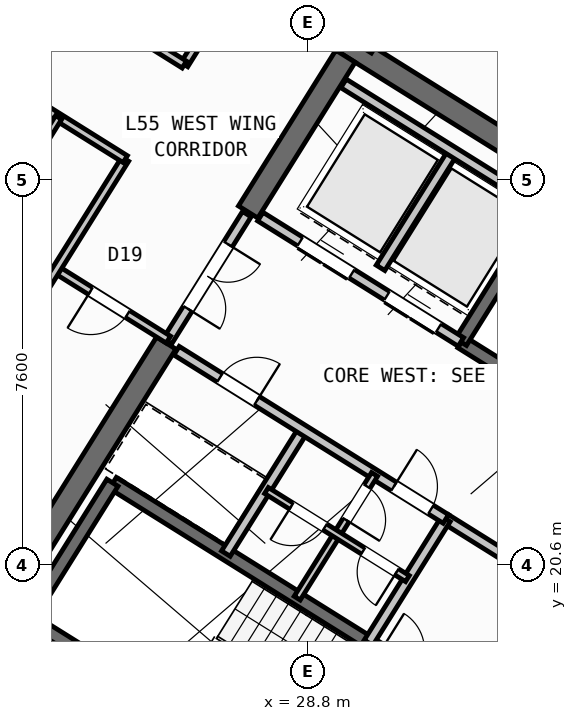
"""IFC4 building model, lengths in metres.
Left out: names, types, materials, properties, quantities, classifications, styles, units other than length and angle.
Written with IfcOpenShell. Run it as: python <this file> out.ifc"""

import sys

from ifc_helpers import new_model, si_unit, direction, frame, frame_2d, origin, origin_2d, place, context, subcontext, project, spatial, rectangle, hollow_rectangle, extrude, source, transform, mapped, element, fill, save


model = new_model("IFC4")
c1 = context("Model", 3, precision=1e-05, world=origin(), true_north=direction((0.0, 1.0)))
c2 = subcontext(c1, "Body", "Model", "MODEL_VIEW")
j1 = project(units=[si_unit("LENGTHUNIT", "METRE"), si_unit("PLANEANGLEUNIT", "RADIAN")], contexts=[c1])
p1 = place(None, origin())
s1 = spatial("IfcSite", under=j1, at=p1, CompositionType="ELEMENT")
p2 = place(p1, origin())
s2 = spatial("IfcBuilding", under=s1, at=p2, CompositionType="ELEMENT")
p3 = place(p2, frame((0.0, 0.0, 218.4)))
s3 = spatial("IfcBuildingStorey", under=s2, at=p3, CompositionType="ELEMENT", Elevation=218.4)
p4 = place(p3, frame((40.531, 24.036, 0.0), z_axis=(0.0, 0.0, 1.0), x_axis=(-0.848048787466, 0.529918157905, 0.0)))
e1 = element("IfcWall", 1, at=p4, inside=s3, PredefinedType="SHEAR", context=c2, shape_type="SweptSolid", body=[
    extrude(rectangle(XDim=13.04, YDim=0.45, at=frame_2d((6.52, 0.0))), origin(), (0.0, 0.0, 1.0), 3.35),
])
p5 = place(p3, frame((33.324, 12.503, 0.0), z_axis=(0.0, 0.0, 1.0), x_axis=(-0.848043529849, 0.529926571782, 0.0)))
e2 = element("IfcWall", 2, at=p5, inside=s3, PredefinedType="SHEAR", context=c2, shape_type="SweptSolid", body=[
    extrude(rectangle(XDim=13.04, YDim=0.45, at=frame_2d((6.52, 0.0))), origin(), (0.0, 0.0, 1.0), 3.35),
])
p6 = place(p3, frame((29.544, 30.636, 0.0), z_axis=(0.0, 0.0, 1.0), x_axis=(-0.529902075036, -0.848058836916, 0.0)))
e3 = element("IfcWall", 3, at=p6, inside=s3, PredefinedType="SHEAR", context=c2, shape_type="SweptSolid", body=[
    extrude(rectangle(XDim=3.625, YDim=0.45, at=frame_2d((1.812, 0.0))), origin(), (0.0, 0.0, 1.0), 3.35),
])
p7 = place(p3, frame((26.007, 24.976, 0.0), z_axis=(0.0, 0.0, 1.0), x_axis=(-0.529931155655, -0.848040665456, 0.0)))
e4 = element("IfcWall", 4, at=p7, inside=s3, PredefinedType="SHEAR", context=c2, shape_type="SweptSolid", body=[
    extrude(rectangle(XDim=6.475, YDim=0.45, at=frame_2d((3.238, 0.0))), origin(), (0.0, 0.0, 1.0), 3.35),
])
m1 = source(origin(), c2, "Body", "SweptSolid", [
    extrude(hollow_rectangle(XDim=0.8, YDim=0.8, WallThickness=0.032, at=origin_2d()), origin(), (0.0, 0.0, 1.0), 3.6),
])
p8 = place(p3, frame((29.928, 31.251, 0.0), z_axis=(0.0, 0.0, 1.0), x_axis=(-0.848048096156, 0.529919264233, 0.0)))
e5 = element("IfcColumn", 5, at=p8, inside=s3, PredefinedType="COLUMN", context=c2, shape_type="MappedRepresentation", body=[
    mapped(m1, transform((0.0, 0.0, 0.0), scale=1.0)),
])
p9 = place(p3, frame((31.76, 12.183, 0.0), z_axis=(0.0, 0.0, 1.0), x_axis=(-0.848047074256, 0.529920899612, 0.0)))
e6 = element("IfcWall", 6, at=p9, inside=s3, PredefinedType="STANDARD", context=c2, shape_type="SweptSolid", body=[
    extrude(rectangle(XDim=30.652, YDim=0.32, at=frame_2d((15.326, 0.0))), origin(), (0.0, 0.0, 1.0), 3.35),
])
p10 = place(p9, frame((15.166, 0.0, 0.0)))
e7 = element("IfcOpeningElement", 7, at=p10, cuts=e6, PredefinedType="OPENING", context=c2, shape_type="SweptSolid", body=[
    extrude(rectangle(XDim=1.2, YDim=2.15, at=frame_2d((0.6, 1.075))), frame((0.0, 0.17, 0.0), z_axis=(0.0, -1.0, 0.0), x_axis=(1.0, 0.0, 0.0)), (0.0, 0.0, 1.0), 0.34),
])
p11 = place(p9, frame((2.24, 0.0, 0.9)))
e8 = element("IfcOpeningElement", 8, at=p11, cuts=e6, PredefinedType="OPENING", context=c2, shape_type="SweptSolid", body=[
    extrude(rectangle(XDim=1.65, YDim=1.45, at=frame_2d((0.825, 0.725))), frame((0.0, 0.17, 0.0), z_axis=(0.0, -1.0, 0.0), x_axis=(1.0, 0.0, 0.0)), (0.0, 0.0, 1.0), 0.34),
])
p12 = place(p9, frame((7.469, 0.0, 0.9)))
e9 = element("IfcOpeningElement", 9, at=p12, cuts=e6, PredefinedType="OPENING", context=c2, shape_type="SweptSolid", body=[
    extrude(rectangle(XDim=1.65, YDim=1.45, at=frame_2d((0.825, 0.725))), frame((0.0, 0.17, 0.0), z_axis=(0.0, -1.0, 0.0), x_axis=(1.0, 0.0, 0.0)), (0.0, 0.0, 1.0), 0.34),
])
p13 = place(p9, frame((12.623, 0.0, 1.0)))
e10 = element("IfcOpeningElement", 10, at=p13, cuts=e6, PredefinedType="OPENING", context=c2, shape_type="SweptSolid", body=[
    extrude(rectangle(XDim=0.9, YDim=1.25, at=frame_2d((0.45, 0.625))), frame((0.0, 0.17, 0.0), z_axis=(0.0, -1.0, 0.0), x_axis=(1.0, 0.0, 0.0)), (0.0, 0.0, 1.0), 0.34),
])
p14 = place(p9, frame((19.583, 0.0, 1.0)))
e11 = element("IfcOpeningElement", 11, at=p14, cuts=e6, PredefinedType="OPENING", context=c2, shape_type="SweptSolid", body=[
    extrude(rectangle(XDim=0.9, YDim=1.25, at=frame_2d((0.45, 0.625))), frame((0.0, 0.17, 0.0), z_axis=(0.0, -1.0, 0.0), x_axis=(1.0, 0.0, 0.0)), (0.0, 0.0, 1.0), 0.34),
])
p15 = place(p9, frame((22.033, 0.0, 1.0)))
e12 = element("IfcOpeningElement", 12, at=p15, cuts=e6, PredefinedType="OPENING", context=c2, shape_type="SweptSolid", body=[
    extrude(rectangle(XDim=0.9, YDim=1.25, at=frame_2d((0.45, 0.625))), frame((0.0, 0.17, 0.0), z_axis=(0.0, -1.0, 0.0), x_axis=(1.0, 0.0, 0.0)), (0.0, 0.0, 1.0), 0.34),
])
p16 = place(p9, frame((27.666, 0.0, 0.9)))
e13 = element("IfcOpeningElement", 13, at=p16, cuts=e6, PredefinedType="OPENING", context=c2, shape_type="SweptSolid", body=[
    extrude(rectangle(XDim=1.35, YDim=1.45, at=frame_2d((0.675, 0.725))), frame((0.0, 0.17, 0.0), z_axis=(0.0, -1.0, 0.0), x_axis=(1.0, 0.0, 0.0)), (0.0, 0.0, 1.0), 0.34),
])
p17 = place(p3, frame((29.605, 15.581, 0.0), z_axis=(0.0, 0.0, 1.0), x_axis=(-0.848036911448, 0.529937163087, 0.0)))
e14 = element("IfcWall", 14, at=p17, inside=s3, PredefinedType="SHEAR", context=c2, shape_type="SweptSolid", body=[
    extrude(rectangle(XDim=7.46, YDim=0.26, at=frame_2d((3.73, 0.0))), origin(), (0.0, 0.0, 1.0), 3.35),
])
p18 = place(p3, frame((31.28, 18.261, 0.0), z_axis=(0.0, 0.0, 1.0), x_axis=(-0.848051618787, 0.529913626805, 0.0)))
e15 = element("IfcWall", 15, at=p18, inside=s3, PredefinedType="SHEAR", context=c2, shape_type="SweptSolid", body=[
    extrude(rectangle(XDim=7.46, YDim=0.26, at=frame_2d((3.73, 0.0))), origin(), (0.0, 0.0, 1.0), 3.35),
])
p19 = place(p18, frame((0.36, 0.0, 0.0)))
e16 = element("IfcOpeningElement", 16, at=p19, cuts=e15, PredefinedType="OPENING", context=c2, shape_type="SweptSolid", body=[
    extrude(rectangle(XDim=0.86, YDim=2.05, at=frame_2d((0.43, 1.025))), frame((0.0, 0.14, 0.0), z_axis=(0.0, -1.0, 0.0), x_axis=(1.0, 0.0, 0.0)), (0.0, 0.0, 1.0), 0.28),
])
p20 = place(p3, frame((24.945, 22.22, 0.0), z_axis=(0.0, 0.0, 1.0), x_axis=(-0.529908658664, -0.84805472316, 0.0)))
e17 = element("IfcWall", 17, at=p20, inside=s3, PredefinedType="SHEAR", context=c2, shape_type="SweptSolid", body=[
    extrude(rectangle(XDim=3.16, YDim=0.26, at=frame_2d((1.58, 0.0))), origin(), (0.0, 0.0, 1.0), 3.35),
])
p21 = place(p3, frame((38.046, 21.108, 0.0), z_axis=(0.0, 0.0, 1.0), x_axis=(-0.848054434086, 0.529909121291, 0.0)))
e18 = element("IfcWall", 18, at=p21, inside=s3, PredefinedType="SHEAR", context=c2, shape_type="SweptSolid", body=[
    extrude(rectangle(XDim=7.33, YDim=0.26, at=frame_2d((3.665, 0.0))), origin(), (0.0, 0.0, 1.0), 3.35),
])
p22 = place(p21, frame((0.22, 0.0, 0.0)))
e19 = element("IfcOpeningElement", 19, at=p22, cuts=e18, PredefinedType="OPENING", context=c2, shape_type="SweptSolid", body=[
    extrude(rectangle(XDim=1.1, YDim=2.1, at=frame_2d((0.55, 1.05))), frame((0.0, 0.14, 0.0), z_axis=(0.0, -1.0, 0.0), x_axis=(1.0, 0.0, 0.0)), (0.0, 0.0, 1.0), 0.28),
])
p23 = place(p3, frame((33.496, 27.677, 0.0), z_axis=(0.0, 0.0, 1.0), x_axis=(-0.529908658664, -0.84805472316, 0.0)))
e20 = element("IfcWall", 20, at=p23, inside=s3, PredefinedType="SHEAR", context=c2, shape_type="SweptSolid", body=[
    extrude(rectangle(XDim=3.16, YDim=0.26, at=frame_2d((1.58, 0.0))), origin(), (0.0, 0.0, 1.0), 3.35),
])
p24 = place(p3, frame((36.459, 18.421, 0.0), z_axis=(0.0, 0.0, 1.0), x_axis=(-0.848059591691, 0.529900867089, 0.0)))
e21 = element("IfcWall", 21, at=p24, inside=s3, PredefinedType="STANDARD", context=c2, shape_type="SweptSolid", body=[
    extrude(rectangle(XDim=5.818, YDim=0.2, at=frame_2d((2.909, 0.0))), origin(), (0.0, 0.0, 1.0), 3.34),
])
p25 = place(p24, frame((2.598, 0.0, 0.0)))
e22 = element("IfcOpeningElement", 22, at=p25, cuts=e21, PredefinedType="OPENING", context=c2, shape_type="SweptSolid", body=[
    extrude(rectangle(XDim=1.15, YDim=2.1, at=frame_2d((0.575, 1.05))), frame((0.0, 0.11, 0.0), z_axis=(0.0, -1.0, 0.0), x_axis=(1.0, 0.0, 0.0)), (0.0, 0.0, 1.0), 0.22),
])
p26 = place(p3, frame((31.822, 24.998, 0.0), z_axis=(0.0, 0.0, 1.0), x_axis=(-0.848054125777, 0.529909614701, 0.0)))
e23 = element("IfcWall", 23, at=p26, inside=s3, PredefinedType="STANDARD", context=c2, shape_type="SweptSolid", body=[
    extrude(rectangle(XDim=4.668, YDim=0.2, at=frame_2d((2.334, 0.0))), origin(), (0.0, 0.0, 1.0), 3.34),
])
p27 = place(p26, frame((0.52, 0.0, 0.0)))
e24 = element("IfcOpeningElement", 24, at=p27, cuts=e23, PredefinedType="OPENING", context=c2, shape_type="SweptSolid", body=[
    extrude(rectangle(XDim=1.2, YDim=2.15, at=frame_2d((0.6, 1.075))), frame((0.0, 0.11, 0.0), z_axis=(0.0, -1.0, 0.0), x_axis=(1.0, 0.0, 0.0)), (0.0, 0.0, 1.0), 0.22),
])
p28 = place(p26, frame((2.54, 0.0, 0.0)))
e25 = element("IfcOpeningElement", 25, at=p28, cuts=e23, PredefinedType="OPENING", context=c2, shape_type="SweptSolid", body=[
    extrude(rectangle(XDim=1.2, YDim=2.15, at=frame_2d((0.6, 1.075))), frame((0.0, 0.11, 0.0), z_axis=(0.0, -1.0, 0.0), x_axis=(1.0, 0.0, 0.0)), (0.0, 0.0, 1.0), 0.22),
])
p29 = place(p3, frame((31.645, 28.716, 0.0), z_axis=(0.0, 0.0, 1.0), x_axis=(-0.52986693015, -0.848080795876, 0.0)))
e26 = element("IfcWall", 26, at=p29, inside=s3, PredefinedType="STANDARD", context=c2, shape_type="SweptSolid", body=[
    extrude(rectangle(XDim=2.66, YDim=0.2, at=frame_2d((1.33, 0.0))), origin(), (0.0, 0.0, 1.0), 3.34),
])
p30 = place(p3, frame((33.363, 27.69, 0.0), z_axis=(0.0, 0.0, 1.0), x_axis=(-0.84804957148, 0.529916903215, 0.0)))
e27 = element("IfcWall", 27, at=p30, inside=s3, PredefinedType="STANDARD", context=c2, shape_type="SweptSolid", body=[
    extrude(rectangle(XDim=4.548, YDim=0.2, at=frame_2d((2.274, 0.0))), origin(), (0.0, 0.0, 1.0), 3.34),
])
for number, where, z_axis, x_axis in (
    (28, (31.525, 21.504, 0.0), (0.0, 0.0, 1.0), (-0.53, -0.848, 0.0)),
    (29, (28.71, 23.263, 0.0), (0.0, 0.0, 1.0), (-0.53, -0.848, 0.0)),
):
    element("IfcWall", number, at=place(p3, frame(where, z_axis=z_axis, x_axis=x_axis)), inside=s3, PredefinedType="STANDARD", context=c2, shape_type="SweptSolid", body=[
        extrude(rectangle(XDim=2.88, YDim=0.2, at=frame_2d((1.44, 0.0))), origin(), (0.0, 0.0, 1.0), 3.34),
    ])
p31 = place(p3, frame((31.525, 21.504, 0.0), z_axis=(0.0, 0.0, 1.0), x_axis=(-0.848042066329, 0.529928913853, 0.0)))
e30 = element("IfcWall", 30, at=p31, inside=s3, PredefinedType="STANDARD", context=c2, shape_type="SweptSolid", body=[
    extrude(rectangle(XDim=6.268, YDim=0.2, at=frame_2d((3.134, 0.0))), origin(), (0.0, 0.0, 1.0), 3.34),
])
p32 = place(p31, frame((4.4, 0.0, 0.0)))
e31 = element("IfcOpeningElement", 31, at=p32, cuts=e30, PredefinedType="OPENING", context=c2, shape_type="SweptSolid", body=[
    extrude(rectangle(XDim=0.86, YDim=2.05, at=frame_2d((0.43, 1.025))), frame((0.0, 0.11, 0.0), z_axis=(0.0, -1.0, 0.0), x_axis=(1.0, 0.0, 0.0)), (0.0, 0.0, 1.0), 0.22),
])
p33 = place(p31, frame((0.35, 0.0, 0.0)))
e32 = element("IfcOpeningElement", 32, at=p33, cuts=e30, PredefinedType="OPENING", context=c2, shape_type="SweptSolid", body=[
    extrude(rectangle(XDim=0.86, YDim=2.05, at=frame_2d((0.43, 1.025))), frame((0.0, 0.11, 0.0), z_axis=(0.0, -1.0, 0.0), x_axis=(1.0, 0.0, 0.0)), (0.0, 0.0, 1.0), 0.22),
])
p34 = place(p3, frame((30.117, 22.384, 0.0), z_axis=(0.0, 0.0, 1.0), x_axis=(-0.529951914384, -0.848027693204, 0.0)))
e33 = element("IfcWall", 33, at=p34, inside=s3, PredefinedType="PLUMBINGWALL", context=c2, shape_type="SweptSolid", body=[
    extrude(rectangle(XDim=1.4, YDim=0.14, at=frame_2d((0.7, 0.0))), origin(), (0.0, 0.0, 1.0), 3.34),
])
p35 = place(p34, frame((0.28, 0.0, 0.0)))
e34 = element("IfcOpeningElement", 34, at=p35, cuts=e33, PredefinedType="OPENING", context=c2, shape_type="SweptSolid", body=[
    extrude(rectangle(XDim=0.78, YDim=2.05, at=frame_2d((0.39, 1.025))), frame((0.0, 0.08, 0.0), z_axis=(0.0, -1.0, 0.0), x_axis=(1.0, 0.0, 0.0)), (0.0, 0.0, 1.0), 0.16),
])
p36 = place(p3, frame((29.375, 21.196, 0.0), z_axis=(0.0, 0.0, 1.0), x_axis=(-0.529865479138, -0.848081702443, 0.0)))
e35 = element("IfcWall", 35, at=p36, inside=s3, PredefinedType="PLUMBINGWALL", context=c2, shape_type="SweptSolid", body=[
    extrude(rectangle(XDim=1.48, YDim=0.14, at=frame_2d((0.74, 0.0))), origin(), (0.0, 0.0, 1.0), 3.34),
])
p37 = place(p3, frame((30.766, 20.327, 0.0), z_axis=(0.0, 0.0, 1.0), x_axis=(-0.848052663127, 0.529911955482, 0.0)))
e36 = element("IfcWall", 36, at=p37, inside=s3, PredefinedType="PLUMBINGWALL", context=c2, shape_type="SweptSolid", body=[
    extrude(rectangle(XDim=3.28, YDim=0.14, at=frame_2d((1.64, 0.0))), origin(), (0.0, 0.0, 1.0), 3.34),
])
p38 = place(p37, frame((0.25, 0.0, 0.0)))
e37 = element("IfcOpeningElement", 37, at=p38, cuts=e36, PredefinedType="OPENING", context=c2, shape_type="SweptSolid", body=[
    extrude(rectangle(XDim=0.78, YDim=2.05, at=frame_2d((0.39, 1.025))), frame((0.0, 0.08, 0.0), z_axis=(0.0, -1.0, 0.0), x_axis=(1.0, 0.0, 0.0)), (0.0, 0.0, 1.0), 0.16),
])
p39 = place(p37, frame((1.92, 0.0, 0.0)))
e38 = element("IfcOpeningElement", 38, at=p39, cuts=e36, PredefinedType="OPENING", context=c2, shape_type="SweptSolid", body=[
    extrude(rectangle(XDim=0.78, YDim=2.05, at=frame_2d((0.39, 1.025))), frame((0.0, 0.08, 0.0), z_axis=(0.0, -1.0, 0.0), x_axis=(1.0, 0.0, 0.0)), (0.0, 0.0, 1.0), 0.16),
])
p40 = place(p3, frame((27.596, 27.52, 0.0), z_axis=(0.0, 0.0, 1.0), x_axis=(-0.529865479138, -0.848081702443, 0.0)))
e39 = element("IfcWall", 39, at=p40, inside=s3, PredefinedType="STANDARD", context=c2, shape_type="SweptSolid", body=[
    extrude(rectangle(XDim=2.96, YDim=0.2, at=frame_2d((1.48, 0.0))), origin(), (0.0, 0.0, 1.0), 3.34),
])
p41 = place(p40, frame((0.7, 0.0, 0.0)))
e40 = element("IfcOpeningElement", 40, at=p41, cuts=e39, PredefinedType="OPENING", context=c2, shape_type="SweptSolid", body=[
    extrude(rectangle(XDim=1.5, YDim=2.15, at=frame_2d((0.75, 1.075))), frame((0.0, 0.11, 0.0), z_axis=(0.0, -1.0, 0.0), x_axis=(1.0, 0.0, 0.0)), (0.0, 0.0, 1.0), 0.22),
])
p42 = place(p3, frame((26.049, 25.044, 0.0), z_axis=(0.0, 0.0, 1.0), x_axis=(-0.848050851465, 0.529914854792, 0.0)))
e41 = element("IfcWall", 41, at=p42, inside=s3, PredefinedType="PARTITIONING", context=c2, shape_type="SweptSolid", body=[
    extrude(rectangle(XDim=2.61, YDim=0.16, at=frame_2d((1.305, 0.0))), origin(), (0.0, 0.0, 1.0), 2.825),
])
p43 = place(p42, frame((0.95, 0.0, 0.0)))
e42 = element("IfcOpeningElement", 42, at=p43, cuts=e41, PredefinedType="OPENING", context=c2, shape_type="SweptSolid", body=[
    extrude(rectangle(XDim=0.86, YDim=2.05, at=frame_2d((0.43, 1.025))), frame((0.0, 0.09, 0.0), z_axis=(0.0, -1.0, 0.0), x_axis=(1.0, 0.0, 0.0)), (0.0, 0.0, 1.0), 0.18),
])
p44 = place(p3, frame((31.239, 38.274, 0.0), z_axis=(0.0, 0.0, 1.0), x_axis=(-0.529920220799, -0.848047498427, 0.0)))
e43 = element("IfcWall", 43, at=p44, inside=s3, PredefinedType="PARTITIONING", context=c2, shape_type="SweptSolid", body=[
    extrude(rectangle(XDim=9.2, YDim=0.16, at=frame_2d((4.6, 0.0))), origin(), (0.0, 0.0, 1.0), 3.34),
])
p45 = place(p3, frame((25.198, 28.606, 0.0), z_axis=(0.0, 0.0, 1.0), x_axis=(-0.529926497642, -0.848043576178, 0.0)))
e44 = element("IfcWall", 44, at=p45, inside=s3, PredefinedType="PARTITIONING", context=c2, shape_type="SweptSolid", body=[
    extrude(rectangle(XDim=10.3, YDim=0.16, at=frame_2d((5.15, 0.0))), origin(), (0.0, 0.0, 1.0), 3.34),
])
p46 = place(p3, frame((26.363, 30.472, 0.0), z_axis=(0.0, 0.0, 1.0), x_axis=(-0.848052408131, 0.529912363569, 0.0)))
e45 = element("IfcWall", 45, at=p46, inside=s3, PredefinedType="PARTITIONING", context=c2, shape_type="SweptSolid", body=[
    extrude(rectangle(XDim=16.73, YDim=0.16, at=frame_2d((8.365, 0.0))), origin(), (0.0, 0.0, 1.0), 3.34),
])
p47 = place(p46, frame((2.22, 0.0, 0.0)))
e46 = element("IfcOpeningElement", 46, at=p47, cuts=e45, PredefinedType="OPENING", context=c2, shape_type="SweptSolid", body=[
    extrude(rectangle(XDim=0.86, YDim=2.05, at=frame_2d((0.43, 1.025))), frame((0.0, 0.09, 0.0), z_axis=(0.0, -1.0, 0.0), x_axis=(1.0, 0.0, 0.0)), (0.0, 0.0, 1.0), 0.18),
])
p48 = place(p46, frame((7.82, 0.0, 0.0)))
e47 = element("IfcOpeningElement", 47, at=p48, cuts=e45, PredefinedType="OPENING", context=c2, shape_type="SweptSolid", body=[
    extrude(rectangle(XDim=1.0, YDim=2.1, at=frame_2d((0.5, 1.05))), frame((0.0, 0.09, 0.0), z_axis=(0.0, -1.0, 0.0), x_axis=(1.0, 0.0, 0.0)), (0.0, 0.0, 1.0), 0.18),
])
p49 = place(p46, frame((12.95, 0.0, 0.0)))
e48 = element("IfcOpeningElement", 48, at=p49, cuts=e45, PredefinedType="OPENING", context=c2, shape_type="SweptSolid", body=[
    extrude(rectangle(XDim=1.0, YDim=2.1, at=frame_2d((0.5, 1.05))), frame((0.0, 0.09, 0.0), z_axis=(0.0, -1.0, 0.0), x_axis=(1.0, 0.0, 0.0)), (0.0, 0.0, 1.0), 0.18),
])
p50 = place(p3, frame((25.198, 28.606, 0.0), z_axis=(0.0, 0.0, 1.0), x_axis=(-0.848052408131, 0.529912363569, 0.0)))
e49 = element("IfcWall", 49, at=p50, inside=s3, PredefinedType="PARTITIONING", context=c2, shape_type="SweptSolid", body=[
    extrude(rectangle(XDim=16.73, YDim=0.16, at=frame_2d((8.365, 0.0))), origin(), (0.0, 0.0, 1.0), 3.34),
])
p51 = place(p50, frame((2.22, 0.0, 0.0)))
e50 = element("IfcOpeningElement", 50, at=p51, cuts=e49, PredefinedType="OPENING", context=c2, shape_type="SweptSolid", body=[
    extrude(rectangle(XDim=0.86, YDim=2.05, at=frame_2d((0.43, 1.025))), frame((0.0, 0.09, 0.0), z_axis=(0.0, -1.0, 0.0), x_axis=(1.0, 0.0, 0.0)), (0.0, 0.0, 1.0), 0.18),
])
p52 = place(p50, frame((12.084, 0.0, 0.0)))
e51 = element("IfcOpeningElement", 51, at=p52, cuts=e49, PredefinedType="OPENING", context=c2, shape_type="SweptSolid", body=[
    extrude(rectangle(XDim=1.0, YDim=2.1, at=frame_2d((0.5, 1.05))), frame((0.0, 0.09, 0.0), z_axis=(0.0, -1.0, 0.0), x_axis=(1.0, 0.0, 0.0)), (0.0, 0.0, 1.0), 0.18),
])
p53 = place(p3, frame((23.883, 29.427, 0.0), z_axis=(0.0, 0.0, 1.0), x_axis=(-0.529950281337, -0.84802871373, 0.0)))
e52 = element("IfcWall", 52, at=p53, inside=s3, PredefinedType="PLUMBINGWALL", context=c2, shape_type="SweptSolid", body=[
    extrude(rectangle(XDim=4.51, YDim=0.14, at=frame_2d((2.255, 0.0))), origin(), (0.0, 0.0, 1.0), 2.995),
])
p54 = place(p53, frame((1.865, 0.0, 0.0)))
e53 = element("IfcOpeningElement", 53, at=p54, cuts=e52, PredefinedType="OPENING", context=c2, shape_type="SweptSolid", body=[
    extrude(rectangle(XDim=0.78, YDim=2.05, at=frame_2d((0.39, 1.025))), frame((0.0, 0.08, 0.0), z_axis=(0.0, -1.0, 0.0), x_axis=(1.0, 0.0, 0.0)), (0.0, 0.0, 1.0), 0.16),
])
p55 = place(p3, frame((41.936, 26.012, 0.0), z_axis=(0.0, 0.0, 1.0), x_axis=(-0.848051154596, 0.529914369676, 0.0)))
e54 = element("IfcWall", 54, at=p55, inside=s3, PredefinedType="PARTITIONING", context=c2, shape_type="SweptSolid", body=[
    extrude(rectangle(XDim=15.57, YDim=0.16, at=frame_2d((7.785, 0.0))), origin(), (0.0, 0.0, 1.0), 3.34),
])
p56 = place(p55, frame((3.415, 0.0, 0.0)))
e55 = element("IfcOpeningElement", 55, at=p56, cuts=e54, PredefinedType="OPENING", context=c2, shape_type="SweptSolid", body=[
    extrude(rectangle(XDim=1.0, YDim=2.1, at=frame_2d((0.5, 1.05))), frame((0.0, 0.09, 0.0), z_axis=(0.0, -1.0, 0.0), x_axis=(1.0, 0.0, 0.0)), (0.0, 0.0, 1.0), 0.18),
])
p57 = place(p55, frame((10.565, 0.0, 0.0)))
e56 = element("IfcOpeningElement", 56, at=p57, cuts=e54, PredefinedType="OPENING", context=c2, shape_type="SweptSolid", body=[
    extrude(rectangle(XDim=1.0, YDim=2.1, at=frame_2d((0.5, 1.05))), frame((0.0, 0.09, 0.0), z_axis=(0.0, -1.0, 0.0), x_axis=(1.0, 0.0, 0.0)), (0.0, 0.0, 1.0), 0.18),
])
m2 = source(origin(), c2, "Body", "SweptSolid", [
    extrude(rectangle(XDim=1.2, YDim=2.15, at=frame_2d((0.6, 1.075))), frame((0.0, 0.025, 0.0), z_axis=(0.0, -1.0, 0.0), x_axis=(1.0, 0.0, 0.0)), (0.0, 0.0, 1.0), 0.05),
])
p58 = place(p27, origin())
e57 = element("IfcDoor", 57, at=p58, inside=s3, OperationType="DOUBLE_DOOR_SLIDING", PredefinedType="DOOR", context=c2, shape_type="MappedRepresentation", body=[
    mapped(m2, transform((0.0, 0.0, 0.0), scale=1.0)),
])
fill(e24, e57)
p59 = place(p28, origin())
e58 = element("IfcDoor", 58, at=p59, inside=s3, OperationType="DOUBLE_DOOR_SLIDING", PredefinedType="DOOR", context=c2, shape_type="MappedRepresentation", body=[
    mapped(m2, transform((0.0, 0.0, 0.0), scale=1.0)),
])
fill(e25, e58)
m3 = source(origin(), c2, "Body", "SweptSolid", [
    extrude(rectangle(XDim=0.86, YDim=2.05, at=frame_2d((0.43, 1.025))), frame((0.0, 0.025, 0.0), z_axis=(0.0, -1.0, 0.0), x_axis=(1.0, 0.0, 0.0)), (0.0, 0.0, 1.0), 0.05),
])
p60 = place(p32, frame((0.86, 0.0, 0.0), z_axis=(0.0, 0.0, 1.0), x_axis=(-1.0, 0.0, 0.0)))
e59 = element("IfcDoor", 59, at=p60, inside=s3, OperationType="SINGLE_SWING_RIGHT", PredefinedType="DOOR", context=c2, shape_type="MappedRepresentation", body=[
    mapped(m3, transform((0.0, 0.0, 0.0), scale=1.0)),
])
fill(e31, e59)
p61 = place(p33, frame((0.86, 0.0, 0.0), z_axis=(0.0, 0.0, 1.0), x_axis=(-1.0, 0.0, 0.0)))
e60 = element("IfcDoor", 60, at=p61, inside=s3, OperationType="SINGLE_SWING_LEFT", PredefinedType="DOOR", context=c2, shape_type="MappedRepresentation", body=[
    mapped(m3, transform((0.0, 0.0, 0.0), scale=1.0)),
])
fill(e32, e60)
m4 = source(origin(), c2, "Body", "SweptSolid", [
    extrude(rectangle(XDim=0.78, YDim=2.05, at=frame_2d((0.39, 1.025))), frame((0.0, 0.025, 0.0), z_axis=(0.0, -1.0, 0.0), x_axis=(1.0, 0.0, 0.0)), (0.0, 0.0, 1.0), 0.05),
])
p62 = place(p35, origin())
e61 = element("IfcDoor", 61, at=p62, inside=s3, OperationType="SINGLE_SWING_RIGHT", PredefinedType="DOOR", context=c2, shape_type="MappedRepresentation", body=[
    mapped(m4, transform((0.0, 0.0, 0.0), scale=1.0)),
])
fill(e34, e61)
p63 = place(p38, origin())
e62 = element("IfcDoor", 62, at=p63, inside=s3, OperationType="SINGLE_SWING_LEFT", PredefinedType="DOOR", context=c2, shape_type="MappedRepresentation", body=[
    mapped(m4, transform((0.0, 0.0, 0.0), scale=1.0)),
])
fill(e37, e62)
p64 = place(p39, origin())
e63 = element("IfcDoor", 63, at=p64, inside=s3, OperationType="SINGLE_SWING_RIGHT", PredefinedType="DOOR", context=c2, shape_type="MappedRepresentation", body=[
    mapped(m4, transform((0.0, 0.0, 0.0), scale=1.0)),
])
fill(e38, e63)
p65 = place(p43, origin())
e64 = element("IfcDoor", 64, at=p65, inside=s3, OperationType="SINGLE_SWING_RIGHT", PredefinedType="DOOR", context=c2, shape_type="MappedRepresentation", body=[
    mapped(m3, transform((0.0, 0.0, 0.0), scale=1.0)),
])
fill(e42, e64)
m5 = source(origin(), c2, "Body", "SweptSolid", [
    extrude(rectangle(XDim=1.5, YDim=2.15, at=frame_2d((0.75, 1.075))), frame((0.0, 0.025, 0.0), z_axis=(0.0, -1.0, 0.0), x_axis=(1.0, 0.0, 0.0)), (0.0, 0.0, 1.0), 0.05),
])
p66 = place(p41, origin())
e65 = element("IfcDoor", 65, at=p66, inside=s3, OperationType="DOUBLE_DOOR_SINGLE_SWING", PredefinedType="DOOR", context=c2, shape_type="MappedRepresentation", body=[
    mapped(m5, transform((0.0, 0.0, 0.0), scale=1.0)),
])
fill(e40, e65)
save(model, sys.argv[1])
